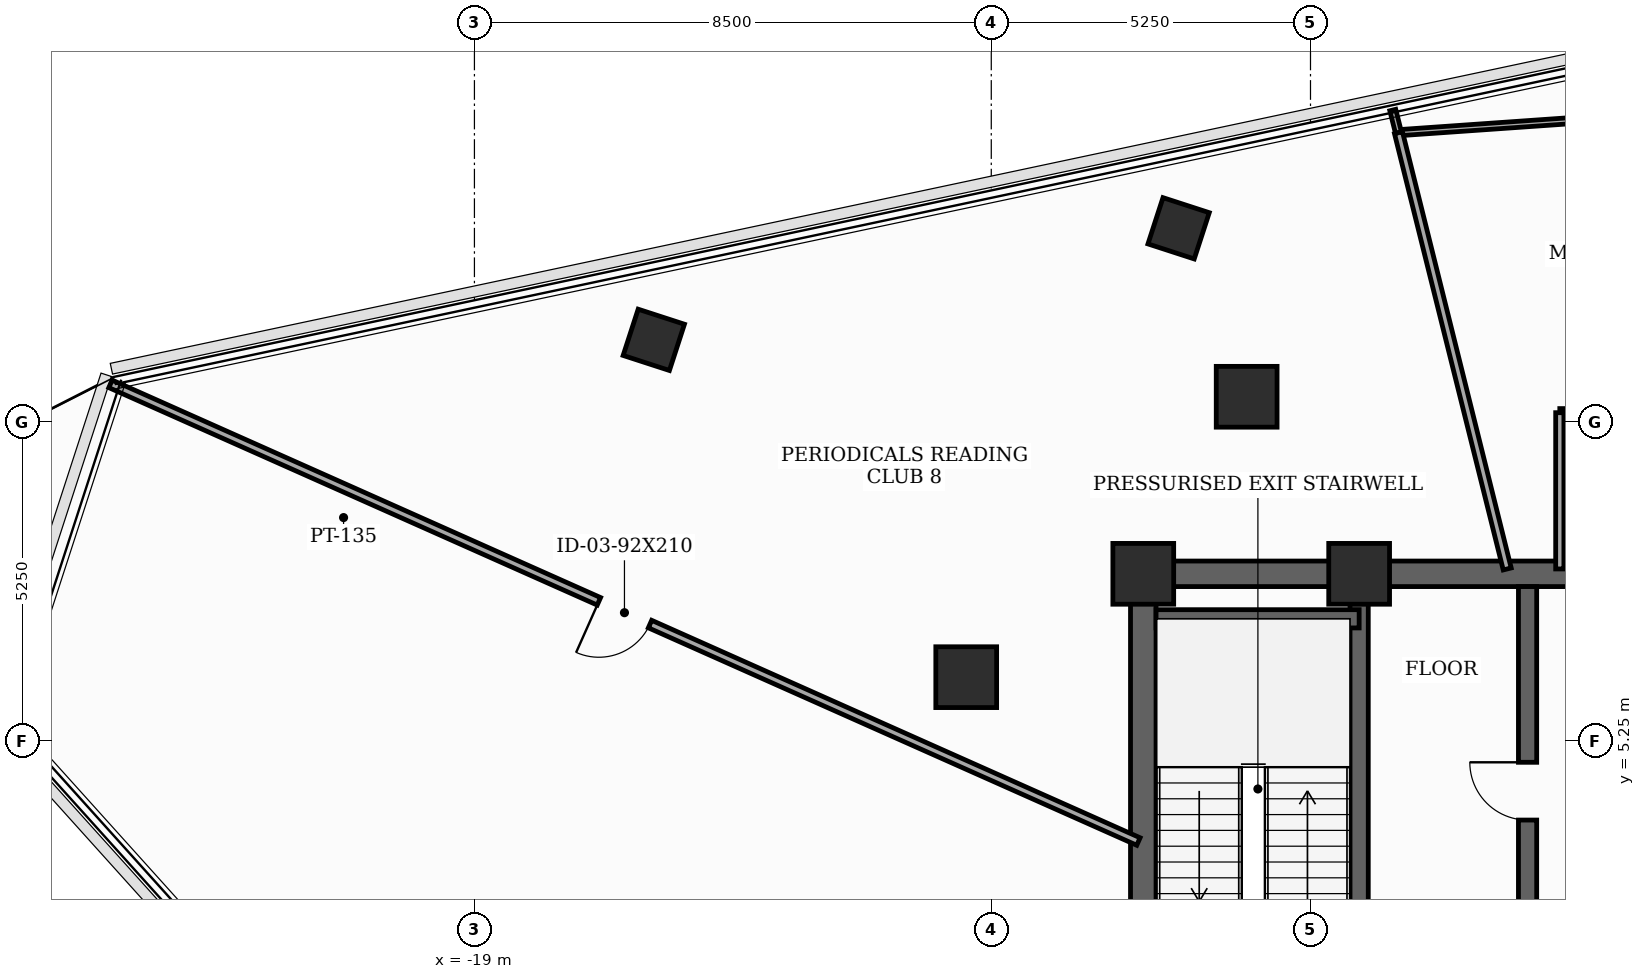
"""IFC4 building model, lengths in metres.
Left out: names, types, materials, properties, quantities, classifications, styles, units other than length and angle.
Written with IfcOpenShell. Run it as: python <this file> out.ifc"""

import sys

from ifc_helpers import new_model, si_unit, direction, frame, frame_2d, origin, origin_2d, place, context, subcontext, project, spatial, rectangle, extrude, element, fill, save


model = new_model("IFC4")
c1 = context("Model", 3, precision=1e-05, world=origin(), true_north=direction((0.0, 1.0)))
c2 = subcontext(c1, "Body", "Model", "MODEL_VIEW")
j1 = project(units=[si_unit("LENGTHUNIT", "METRE"), si_unit("PLANEANGLEUNIT", "RADIAN")], contexts=[c1])
p1 = place(None, origin())
s1 = spatial("IfcSite", under=j1, at=p1, CompositionType="ELEMENT")
p2 = place(p1, origin())
s2 = spatial("IfcBuilding", under=s1, at=p2, CompositionType="ELEMENT")
p3 = place(p2, frame((0.0, 0.0, 286.9)))
s3 = spatial("IfcBuildingStorey", under=s2, at=p3, CompositionType="ELEMENT", Elevation=286.9)
for number, where, z_axis, x_axis in (
    (1, (-4.45, 8.0, 0.0), (0.0, 0.0, 1.0), (1.0, 0.0, 0.0)),
    (2, (-8.0, 8.0, 0.0), (0.0, 0.0, 1.0), (1.0, 0.0, 0.0)),
    (3, (-6.3, 10.912, 0.0), (0.0, 0.0, 1.0), (1.0, 0.0, 0.0)),
    (4, (-10.912, 6.3, 0.0), (0.0, 0.0, 1.0), (1.0, 0.0, 0.0)),
):
    element("IfcColumn", number, at=place(p3, frame(where, z_axis=z_axis, x_axis=x_axis)), inside=s3, PredefinedType="COLUMN", context=c2, shape_type="SweptSolid", body=[
        extrude(rectangle(XDim=1.0, YDim=1.0, at=origin_2d()), origin(), (0.0, 0.0, 1.0), 3.7),
    ])
for number, where, z_axis, x_axis in (
    (5, (-7.419, 13.683, 0.0), (0.0, 0.0, 1.0), (0.309, 0.951, 0.0)),
    (6, (-16.05, 11.848, 0.0), (0.0, 0.0, 1.0), (0.309, 0.951, 0.0)),
):
    element("IfcColumn", number, at=place(p3, frame(where, z_axis=z_axis, x_axis=x_axis)), inside=s3, PredefinedType="COLUMN", context=c2, shape_type="SweptSolid", body=[
        extrude(rectangle(XDim=0.8, YDim=0.8, at=origin_2d()), origin(), (0.0, 0.0, 1.0), 3.7),
    ])
p4 = place(p3, frame((-8.0, -8.0, 0.0), z_axis=(0.0, 0.0, 1.0), x_axis=(0.0, 1.0, 0.0)))
e7 = element("IfcWall", 7, at=p4, inside=s3, PredefinedType="SHEAR", context=c2, shape_type="SweptSolid", body=[
    extrude(rectangle(XDim=16.0, YDim=0.42, at=frame_2d((8.0, 0.0))), origin(), (0.0, 0.0, 1.0), 3.5),
])
p5 = place(p4, frame((0.681, 0.0, 0.0)))
e8 = element("IfcOpeningElement", 8, at=p5, cuts=e7, PredefinedType="OPENING", context=c2, shape_type="SweptSolid", body=[
    extrude(rectangle(XDim=0.85, YDim=2.02, at=frame_2d((0.425, 1.01))), frame((0.0, 0.22, 0.0), z_axis=(0.0, -1.0, 0.0), x_axis=(1.0, 0.0, 0.0)), (0.0, 0.0, 1.0), 0.44),
])
p6 = place(p4, frame((5.35, 0.0, 0.0)))
e9 = element("IfcOpeningElement", 9, at=p6, cuts=e7, PredefinedType="OPENING", context=c2, shape_type="SweptSolid", body=[
    extrude(rectangle(XDim=1.05, YDim=2.15, at=frame_2d((0.525, 1.075))), frame((0.0, 0.22, 0.0), z_axis=(0.0, -1.0, 0.0), x_axis=(1.0, 0.0, 0.0)), (0.0, 0.0, 1.0), 0.44),
])
p7 = place(p3, frame((-8.0, 8.0, 0.0), z_axis=(0.0, 0.0, 1.0), x_axis=(1.0, 0.0, 0.0)))
e10 = element("IfcWall", 10, at=p7, inside=s3, PredefinedType="SHEAR", context=c2, shape_type="SweptSolid", body=[
    extrude(rectangle(XDim=16.0, YDim=0.42, at=frame_2d((8.0, 0.0))), origin(), (0.0, 0.0, 1.0), 3.5),
])
p8 = place(p7, frame((7.1, 0.0, 0.0)))
e11 = element("IfcOpeningElement", 11, at=p8, cuts=e10, PredefinedType="OPENING", context=c2, shape_type="SweptSolid", body=[
    extrude(rectangle(XDim=1.8, YDim=2.15, at=frame_2d((0.9, 1.075))), frame((0.0, 0.22, 0.0), z_axis=(0.0, -1.0, 0.0), x_axis=(1.0, 0.0, 0.0)), (0.0, 0.0, 1.0), 0.44),
])
p9 = place(p3, frame((-4.45, -7.79, 0.0), z_axis=(0.0, 0.0, 1.0), x_axis=(0.0, 1.0, 0.0)))
e12 = element("IfcWall", 12, at=p9, inside=s3, PredefinedType="SHEAR", context=c2, shape_type="SweptSolid", body=[
    extrude(rectangle(XDim=15.58, YDim=0.3, at=frame_2d((7.79, 0.0))), origin(), (0.0, 0.0, 1.0), 3.5),
])
p10 = place(p3, frame((-7.79, 7.26, 0.0), z_axis=(0.0, 0.0, 1.0), x_axis=(1.0, 0.0, 0.0)))
e13 = element("IfcWall", 13, at=p10, inside=s3, PredefinedType="SHEAR", context=c2, shape_type="SweptSolid", body=[
    extrude(rectangle(XDim=3.34, YDim=0.3, at=frame_2d((1.67, 0.0))), origin(), (0.0, 0.0, 1.0), 3.5),
])
p11 = place(p3, frame((-1.68, -4.85, 0.0), z_axis=(0.0, 0.0, 1.0), x_axis=(0.0, 1.0, 0.0)))
e14 = element("IfcWall", 14, at=p11, inside=s3, PredefinedType="SHEAR", context=c2, shape_type="SweptSolid", body=[
    extrude(rectangle(XDim=12.64, YDim=0.3, at=frame_2d((6.32, 0.0))), origin(), (0.0, 0.0, 1.0), 3.5),
])
p12 = place(p11, frame((2.6, 0.0, 0.0)))
e15 = element("IfcOpeningElement", 15, at=p12, cuts=e14, PredefinedType="OPENING", context=c2, shape_type="SweptSolid", body=[
    extrude(rectangle(XDim=0.95, YDim=2.1, at=frame_2d((0.475, 1.05))), frame((0.0, 0.16, 0.0), z_axis=(0.0, -1.0, 0.0), x_axis=(1.0, 0.0, 0.0)), (0.0, 0.0, 1.0), 0.32),
])
p13 = place(p11, frame((8.8, 0.0, 0.0)))
e16 = element("IfcOpeningElement", 16, at=p13, cuts=e14, PredefinedType="OPENING", context=c2, shape_type="SweptSolid", body=[
    extrude(rectangle(XDim=0.95, YDim=2.1, at=frame_2d((0.475, 1.05))), frame((0.0, 0.16, 0.0), z_axis=(0.0, -1.0, 0.0), x_axis=(1.0, 0.0, 0.0)), (0.0, 0.0, 1.0), 0.32),
])
p14 = place(p3, frame((10.15, 10.65, 0.0), z_axis=(0.0, 0.0, 1.0), x_axis=(-1.0, 0.0, 0.0)))
e17 = element("IfcWall", 17, at=p14, inside=s3, PredefinedType="PARTITIONING", context=c2, shape_type="SweptSolid", body=[
    extrude(rectangle(XDim=11.3, YDim=0.135, at=frame_2d((5.65, 0.0))), origin(), (0.0, 0.0, 1.0), 2.885),
])
p15 = place(p14, frame((6.531, 0.0, 0.0)))
e18 = element("IfcOpeningElement", 18, at=p15, cuts=e17, PredefinedType="OPENING", context=c2, shape_type="SweptSolid", body=[
    extrude(rectangle(XDim=0.95, YDim=2.1, at=frame_2d((0.475, 1.05))), frame((0.0, 0.077, 0.0), z_axis=(0.0, -1.0, 0.0), x_axis=(1.0, 0.0, 0.0)), (0.0, 0.0, 1.0), 0.155),
])
p16 = place(p3, frame((-1.15, 10.65, 0.0), z_axis=(0.0, 0.0, 1.0), x_axis=(0.0, -1.0, 0.0)))
e19 = element("IfcWall", 19, at=p16, inside=s3, PredefinedType="PARTITIONING", context=c2, shape_type="SweptSolid", body=[
    extrude(rectangle(XDim=2.57, YDim=0.135, at=frame_2d((1.285, 0.0))), origin(), (0.0, 0.0, 1.0), 2.885),
])
p17 = place(p3, frame((-8.08, 3.597, 0.0), z_axis=(0.0, 0.0, 1.0), x_axis=(-0.913542590258, 0.406743083266, 0.0)))
e20 = element("IfcWall", 20, at=p17, inside=s3, PredefinedType="PARTITIONING", context=c2, shape_type="SweptSolid", body=[
    extrude(rectangle(XDim=18.505, YDim=0.135, at=frame_2d((9.252, 0.0))), origin(), (0.0, 0.0, 1.0), 2.885),
])
p18 = place(p17, frame((8.792, 0.0, 0.0)))
e21 = element("IfcOpeningElement", 21, at=p18, cuts=e20, PredefinedType="OPENING", context=c2, shape_type="SweptSolid", body=[
    extrude(rectangle(XDim=0.92, YDim=2.1, at=frame_2d((0.46, 1.05))), frame((0.0, 0.077, 0.0), z_axis=(0.0, -1.0, 0.0), x_axis=(1.0, 0.0, 0.0)), (0.0, 0.0, 1.0), 0.155),
])
p19 = place(p3, frame((-3.803, 15.255, 0.0), z_axis=(0.0, 0.0, 1.0), x_axis=(0.997563622011, 0.069762597718, 0.0)))
e22 = element("IfcWall", 22, at=p19, inside=s3, PredefinedType="MOVABLE", context=c2, shape_type="SweptSolid", body=[
    extrude(rectangle(XDim=5.879, YDim=0.1, at=frame_2d((2.94, 0.0))), origin(), (0.0, 0.0, 1.0), 3.025),
])
p20 = place(p3, frame((-3.897, 15.628, 0.0), z_axis=(0.0, 0.0, 1.0), x_axis=(0.24388032021, -0.969805335835, 0.0)))
e23 = element("IfcWall", 23, at=p20, inside=s3, PredefinedType="MOVABLE", context=c2, shape_type="SweptSolid", body=[
    extrude(rectangle(XDim=0.385, YDim=0.1, at=frame_2d((0.192, 0.0))), origin(), (0.0, 0.0, 1.0), 3.5),
])
p21 = place(p3, frame((-3.803, 15.255, 0.0), z_axis=(0.0, 0.0, 1.0), x_axis=(0.241851911951, -0.970313172479, 0.0)))
e24 = element("IfcWall", 24, at=p21, inside=s3, PredefinedType="PARTITIONING", context=c2, shape_type="SweptSolid", body=[
    extrude(rectangle(XDim=7.394, YDim=0.135, at=frame_2d((3.697, 0.0))), origin(), (0.0, 0.0, 1.0), 2.885),
])
p22 = place(p13, origin())
e25 = element("IfcDoor", 25, at=p22, inside=s3, OperationType="SINGLE_SWING_RIGHT", PredefinedType="DOOR", context=c2, shape_type="SweptSolid", body=[
    extrude(rectangle(XDim=0.95, YDim=2.1, at=frame_2d((0.475, 1.05))), frame((0.0, 0.025, 0.0), z_axis=(0.0, -1.0, 0.0), x_axis=(1.0, 0.0, 0.0)), (0.0, 0.0, 1.0), 0.05),
])
fill(e16, e25)
p23 = place(p18, origin())
e26 = element("IfcDoor", 26, at=p23, inside=s3, OperationType="SINGLE_SWING_RIGHT", PredefinedType="DOOR", context=c2, shape_type="SweptSolid", body=[
    extrude(rectangle(XDim=0.92, YDim=2.1, at=frame_2d((0.46, 1.05))), frame((0.0, 0.025, 0.0), z_axis=(0.0, -1.0, 0.0), x_axis=(1.0, 0.0, 0.0)), (0.0, 0.0, 1.0), 0.05),
])
fill(e21, e26)
save(model, sys.argv[1])
